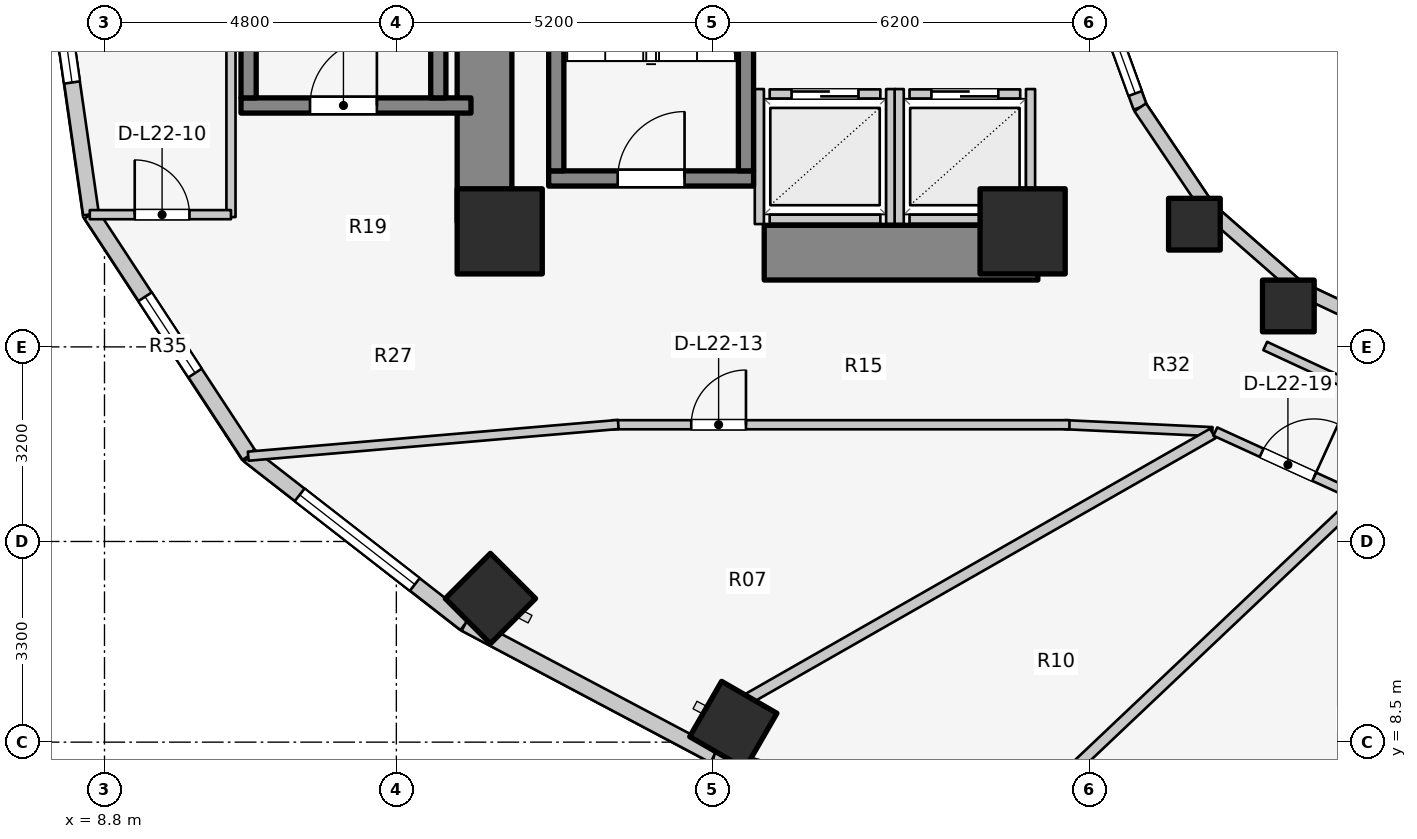
"""IFC4 building model, lengths in metres.
Left out: names, types, materials, properties, quantities, classifications, styles, units other than length and angle.
Written with IfcOpenShell. Run it as: python <this file> out.ifc"""

import sys

from ifc_helpers import new_model, si_unit, direction, frame, frame_2d, origin, origin_2d, place, context, subcontext, project, spatial, rectangle, extrude, element, fill, save


model = new_model("IFC4")
c1 = context("Model", 3, precision=1e-05, world=origin(), true_north=direction((0.0, 1.0)))
c2 = subcontext(c1, "Body", "Model", "MODEL_VIEW")
j1 = project(units=[si_unit("LENGTHUNIT", "METRE"), si_unit("PLANEANGLEUNIT", "RADIAN")], contexts=[c1])
p1 = place(None, origin())
s1 = spatial("IfcSite", under=j1, at=p1, CompositionType="ELEMENT")
p2 = place(p1, origin())
s2 = spatial("IfcBuilding", under=s1, at=p2, CompositionType="ELEMENT")
p3 = place(p2, frame((0.0, 0.0, 76.3)))
s3 = spatial("IfcBuildingStorey", under=s2, at=p3, CompositionType="ELEMENT", Elevation=76.3)
p4 = place(p3, frame((15.05, 17.05, 0.0), z_axis=(0.0, 0.0, 1.0), x_axis=(0.0, 1.0, 0.0)))
e1 = element("IfcWall", 1, at=p4, inside=s3, PredefinedType="SHEAR", context=c2, shape_type="SweptSolid", body=[
    extrude(rectangle(XDim=12.8, YDim=0.9, at=frame_2d((6.4, 0.0))), origin(), (0.0, 0.0, 1.0), 3.1),
])
p5 = place(p3, frame((19.65, 16.55, 0.0), z_axis=(0.0, 0.0, 1.0), x_axis=(1.0, 0.0, 0.0)))
e2 = element("IfcWall", 2, at=p5, inside=s3, PredefinedType="SHEAR", context=c2, shape_type="SweptSolid", body=[
    extrude(rectangle(XDim=4.5, YDim=0.9, at=frame_2d((2.25, 0.0))), origin(), (0.0, 0.0, 1.0), 3.1),
])
p6 = place(p3, frame((16.105, 17.77, 0.0), z_axis=(0.0, 0.0, 1.0), x_axis=(1.0, 0.0, 0.0)))
e3 = element("IfcWall", 3, at=p6, inside=s3, PredefinedType="SOLIDWALL", context=c2, shape_type="SweptSolid", body=[
    extrude(rectangle(XDim=3.37, YDim=0.25, at=frame_2d((1.685, 0.0))), origin(), (0.0, 0.0, 1.0), 3.1),
])
p7 = place(p6, frame((1.135, 0.0, 0.0)))
e4 = element("IfcOpeningElement", 4, at=p7, cuts=e3, PredefinedType="OPENING", context=c2, shape_type="SweptSolid", body=[
    extrude(rectangle(XDim=1.1, YDim=2.1, at=frame_2d((0.55, 1.05))), frame((0.0, 0.135, 0.0), z_axis=(0.0, -1.0, 0.0), x_axis=(1.0, 0.0, 0.0)), (0.0, 0.0, 1.0), 0.27),
])
for number, where, z_axis, x_axis in (
    (5, (16.23, 17.895, 0.0), (0.0, 0.0, 1.0), (0.0, 1.0, 0.0)),
    (6, (19.35, 17.895, 0.0), (0.0, 0.0, 1.0), (0.0, 1.0, 0.0)),
):
    element("IfcWall", number, at=place(p3, frame(where, z_axis=z_axis, x_axis=x_axis)), inside=s3, PredefinedType="SOLIDWALL", context=c2, shape_type="SweptSolid", body=[
        extrude(rectangle(XDim=7.81, YDim=0.25, at=frame_2d((3.905, 0.0))), origin(), (0.0, 0.0, 1.0), 3.1),
    ])
p8 = place(p3, frame((11.045, 18.97, 0.0), z_axis=(0.0, 0.0, 1.0), x_axis=(1.0, 0.0, 0.0)))
e7 = element("IfcWall", 7, at=p8, inside=s3, PredefinedType="SOLIDWALL", context=c2, shape_type="SweptSolid", body=[
    extrude(rectangle(XDim=3.782, YDim=0.25, at=frame_2d((1.891, 0.0))), origin(), (0.0, 0.0, 1.0), 3.1),
])
p9 = place(p8, frame((1.135, 0.0, 0.0)))
e8 = element("IfcOpeningElement", 8, at=p9, cuts=e7, PredefinedType="OPENING", context=c2, shape_type="SweptSolid", body=[
    extrude(rectangle(XDim=1.1, YDim=2.1, at=frame_2d((0.55, 1.05))), frame((0.0, 0.135, 0.0), z_axis=(0.0, -1.0, 0.0), x_axis=(1.0, 0.0, 0.0)), (0.0, 0.0, 1.0), 0.27),
])
for number, where, z_axis, x_axis in (
    (9, (11.17, 19.095, 0.0), (0.0, 0.0, 1.0), (0.0, 1.0, 0.0)),
    (10, (14.29, 19.095, 0.0), (0.0, 0.0, 1.0), (0.0, 1.0, 0.0)),
):
    element("IfcWall", number, at=place(p3, frame(where, z_axis=z_axis, x_axis=x_axis)), inside=s3, PredefinedType="SOLIDWALL", context=c2, shape_type="SweptSolid", body=[
        extrude(rectangle(XDim=7.81, YDim=0.25, at=frame_2d((3.905, 0.0))), origin(), (0.0, 0.0, 1.0), 3.1),
    ])
for number, where, z_axis, x_axis in (
    (11, (15.3, 16.9, 0.0), (0.0, 0.0, 1.0), (1.0, 0.0, 0.0)),
    (12, (23.9, 16.9, 0.0), (0.0, 0.0, 1.0), (1.0, 0.0, 0.0)),
):
    element("IfcColumn", number, at=place(p3, frame(where, z_axis=z_axis, x_axis=x_axis)), inside=s3, PredefinedType="COLUMN", context=c2, shape_type="SweptSolid", body=[
        extrude(rectangle(XDim=1.4, YDim=1.4, at=origin_2d()), origin(), (0.0, 0.0, 1.0), 3.1),
    ])
p10 = place(p3, frame((26.725, 17.018, 0.0), z_axis=(0.0, 0.0, 1.0), x_axis=(1.0, 0.0, 0.0)))
e13 = element("IfcColumn", 13, at=p10, inside=s3, PredefinedType="COLUMN", context=c2, shape_type="SweptSolid", body=[
    extrude(rectangle(XDim=0.85, YDim=0.85, at=origin_2d()), origin(), (0.0, 0.0, 1.0), 3.1),
])
p11 = place(p3, frame((15.147, 10.862, 0.0), z_axis=(0.0, 0.0, 1.0), x_axis=(-0.707106781187, -0.707106781187, 0.0)))
e14 = element("IfcColumn", 14, at=p11, inside=s3, PredefinedType="COLUMN", context=c2, shape_type="SweptSolid", body=[
    extrude(rectangle(XDim=1.05, YDim=1.05, at=origin_2d()), origin(), (0.0, 0.0, 1.0), 3.1),
])
p12 = place(p3, frame((28.27, 15.673, 0.0), z_axis=(0.0, 0.0, 1.0), x_axis=(1.0, 0.0, 0.0)))
e15 = element("IfcColumn", 15, at=p12, inside=s3, PredefinedType="COLUMN", context=c2, shape_type="SweptSolid", body=[
    extrude(rectangle(XDim=0.85, YDim=0.85, at=origin_2d()), origin(), (0.0, 0.0, 1.0), 3.1),
])
p13 = place(p3, frame((19.142, 8.782, 0.0), z_axis=(0.0, 0.0, 1.0), x_axis=(-0.5, -0.866025403784, 0.0)))
e16 = element("IfcColumn", 16, at=p13, inside=s3, PredefinedType="COLUMN", context=c2, shape_type="SweptSolid", body=[
    extrude(rectangle(XDim=1.05, YDim=1.05, at=origin_2d()), origin(), (0.0, 0.0, 1.0), 3.1),
])
p14 = place(p3, frame((25.123, 20.898, 0.0), z_axis=(0.0, 0.0, 1.0), x_axis=(0.341423187295, -0.93990968033, 0.0)))
e17 = element("IfcWall", 17, at=p14, inside=s3, PredefinedType="STANDARD", context=c2, shape_type="SweptSolid", body=[
    extrude(rectangle(XDim=2.084, YDim=0.23, at=frame_2d((1.042, 0.0))), origin(), (0.0, 0.0, 1.0), 2.84),
])
p15 = place(p14, frame((0.242, 0.0, 0.85)))
e18 = element("IfcOpeningElement", 18, at=p15, cuts=e17, PredefinedType="OPENING", context=c2, shape_type="SweptSolid", body=[
    extrude(rectangle(XDim=1.6, YDim=1.65, at=frame_2d((0.8, 0.825))), frame((0.0, 0.125, 0.0), z_axis=(0.0, -1.0, 0.0), x_axis=(1.0, 0.0, 0.0)), (0.0, 0.0, 1.0), 0.25),
])
p16 = place(p3, frame((25.834, 18.94, 0.0), z_axis=(0.0, 0.0, 1.0), x_axis=(0.558197800898, -0.829707909492, 0.0)))
e19 = element("IfcWall", 19, at=p16, inside=s3, PredefinedType="STANDARD", context=c2, shape_type="SweptSolid", body=[
    extrude(rectangle(XDim=2.027, YDim=0.23, at=frame_2d((1.013, 0.0))), origin(), (0.0, 0.0, 1.0), 2.16),
])
p17 = place(p3, frame((26.965, 17.258, 0.0), z_axis=(0.0, 0.0, 1.0), x_axis=(0.752576694707, -0.658504607869, 0.0)))
e20 = element("IfcWall", 20, at=p17, inside=s3, PredefinedType="STANDARD", context=c2, shape_type="SweptSolid", body=[
    extrude(rectangle(XDim=1.959, YDim=0.23, at=frame_2d((0.98, 0.0))), origin(), (0.0, 0.0, 1.0), 2.16),
])
p18 = place(p3, frame((28.44, 15.968, 0.0), z_axis=(0.0, 0.0, 1.0), x_axis=(0.904179699603, -0.427152280606, 0.0)))
e21 = element("IfcWall", 21, at=p18, inside=s3, PredefinedType="STANDARD", context=c2, shape_type="SweptSolid", body=[
    extrude(rectangle(XDim=1.899, YDim=0.23, at=frame_2d((0.95, 0.0))), origin(), (0.0, 0.0, 1.0), 2.16),
])
p19 = place(p3, frame((7.74, 23.0, 0.0), z_axis=(0.0, 0.0, 1.0), x_axis=(0.142572472068, -0.98978436551, 0.0)))
e22 = element("IfcWall", 22, at=p19, inside=s3, PredefinedType="STANDARD", context=c2, shape_type="SweptSolid", body=[
    extrude(rectangle(XDim=5.879, YDim=0.26, at=frame_2d((2.939, 0.0))), origin(), (0.0, 0.0, 1.0), 2.85),
])
p20 = place(p19, frame((2.189, 0.0, 0.75)))
e23 = element("IfcOpeningElement", 23, at=p20, cuts=e22, PredefinedType="OPENING", context=c2, shape_type="SweptSolid", body=[
    extrude(rectangle(XDim=1.5, YDim=1.6, at=frame_2d((0.75, 0.8))), frame((0.0, 0.14, 0.0), z_axis=(0.0, -1.0, 0.0), x_axis=(1.0, 0.0, 0.0)), (0.0, 0.0, 1.0), 0.28),
])
p21 = place(p3, frame((8.578, 17.181, 0.0), z_axis=(0.0, 0.0, 1.0), x_axis=(0.548283220945, -0.836292717672, 0.0)))
e24 = element("IfcWall", 24, at=p21, inside=s3, PredefinedType="STANDARD", context=c2, shape_type="SweptSolid", body=[
    extrude(rectangle(XDim=4.744, YDim=0.26, at=frame_2d((2.372, 0.0))), origin(), (0.0, 0.0, 1.0), 2.85),
])
p22 = place(p21, frame((1.622, 0.0, 0.75)))
e25 = element("IfcOpeningElement", 25, at=p22, cuts=e24, PredefinedType="OPENING", context=c2, shape_type="SweptSolid", body=[
    extrude(rectangle(XDim=1.5, YDim=1.6, at=frame_2d((0.75, 0.8))), frame((0.0, 0.14, 0.0), z_axis=(0.0, -1.0, 0.0), x_axis=(1.0, 0.0, 0.0)), (0.0, 0.0, 1.0), 0.28),
])
p23 = place(p3, frame((11.179, 13.214, 0.0), z_axis=(0.0, 0.0, 1.0), x_axis=(0.789127449954, -0.614229491094, 0.0)))
e26 = element("IfcWall", 26, at=p23, inside=s3, PredefinedType="STANDARD", context=c2, shape_type="SweptSolid", body=[
    extrude(rectangle(XDim=4.505, YDim=0.26, at=frame_2d((2.252, 0.0))), origin(), (0.0, 0.0, 1.0), 2.85),
])
p24 = place(p23, frame((1.052, 0.0, 0.75)))
e27 = element("IfcOpeningElement", 27, at=p24, cuts=e26, PredefinedType="OPENING", context=c2, shape_type="SweptSolid", body=[
    extrude(rectangle(XDim=2.4, YDim=1.7, at=frame_2d((1.2, 0.85))), frame((0.0, 0.14, 0.0), z_axis=(0.0, -1.0, 0.0), x_axis=(1.0, 0.0, 0.0)), (0.0, 0.0, 1.0), 0.28),
])
p25 = place(p3, frame((14.734, 10.447, 0.0), z_axis=(0.0, 0.0, 1.0), x_axis=(0.883668636807, -0.4681129568, 0.0)))
e28 = element("IfcWall", 28, at=p25, inside=s3, PredefinedType="STANDARD", context=c2, shape_type="SweptSolid", body=[
    extrude(rectangle(XDim=4.631, YDim=0.26, at=frame_2d((2.316, 0.0))), origin(), (0.0, 0.0, 1.0), 2.85),
])
p26 = place(p3, frame((18.827, 8.279, 0.0), z_axis=(0.0, 0.0, 1.0), x_axis=(0.962938491413, -0.269721081407, 0.0)))
e29 = element("IfcWall", 29, at=p26, inside=s3, PredefinedType="STANDARD", context=c2, shape_type="SweptSolid", body=[
    extrude(rectangle(XDim=5.563, YDim=0.26, at=frame_2d((2.782, 0.0))), origin(), (0.0, 0.0, 1.0), 2.85),
])
p27 = place(p26, frame((2.031, 0.0, 0.75)))
e30 = element("IfcOpeningElement", 30, at=p27, cuts=e29, PredefinedType="OPENING", context=c2, shape_type="SweptSolid", body=[
    extrude(rectangle(XDim=1.5, YDim=1.6, at=frame_2d((0.75, 0.8))), frame((0.0, 0.14, 0.0), z_axis=(0.0, -1.0, 0.0), x_axis=(1.0, 0.0, 0.0)), (0.0, 0.0, 1.0), 0.28),
])
p28 = place(p3, frame((19.74, 19.16, 0.0), z_axis=(0.0, 0.0, 1.0), x_axis=(1.0, 0.0, 0.0)))
e31 = element("IfcWall", 31, at=p28, inside=s3, PredefinedType="SOLIDWALL", context=c2, shape_type="SweptSolid", body=[
    extrude(rectangle(XDim=1.82, YDim=0.15, at=frame_2d((0.91, 0.0))), origin(), (0.0, 0.0, 1.0), 2.855),
])
p29 = place(p28, frame((0.36, 0.0, 0.0)))
e32 = element("IfcOpeningElement", 32, at=p29, cuts=e31, PredefinedType="OPENING", context=c2, shape_type="SweptSolid", body=[
    extrude(rectangle(XDim=1.1, YDim=2.1, at=frame_2d((0.55, 1.05))), frame((0.0, 0.085, 0.0), z_axis=(0.0, -1.0, 0.0), x_axis=(1.0, 0.0, 0.0)), (0.0, 0.0, 1.0), 0.17),
])
p30 = place(p3, frame((19.74, 17.1, 0.0), z_axis=(0.0, 0.0, 1.0), x_axis=(1.0, 0.0, 0.0)))
e33 = element("IfcWall", 33, at=p30, inside=s3, PredefinedType="SOLIDWALL", context=c2, shape_type="SweptSolid", body=[
    extrude(rectangle(XDim=1.82, YDim=0.15, at=frame_2d((0.91, 0.0))), origin(), (0.0, 0.0, 1.0), 2.855),
])
p31 = place(p3, frame((19.57, 17.02, 0.0), z_axis=(0.0, 0.0, 1.0), x_axis=(0.0, 1.0, 0.0)))
e34 = element("IfcWall", 34, at=p31, inside=s3, PredefinedType="SOLIDWALL", context=c2, shape_type="SweptSolid", body=[
    extrude(rectangle(XDim=2.22, YDim=0.15, at=frame_2d((1.11, 0.0))), origin(), (0.0, 0.0, 1.0), 2.12),
])
p32 = place(p3, frame((21.73, 17.02, 0.0), z_axis=(0.0, 0.0, 1.0), x_axis=(0.0, 1.0, 0.0)))
e35 = element("IfcWall", 35, at=p32, inside=s3, PredefinedType="SOLIDWALL", context=c2, shape_type="SweptSolid", body=[
    extrude(rectangle(XDim=2.22, YDim=0.15, at=frame_2d((1.11, 0.0))), origin(), (0.0, 0.0, 1.0), 2.855),
])
p33 = place(p3, frame((22.04, 19.16, 0.0), z_axis=(0.0, 0.0, 1.0), x_axis=(1.0, 0.0, 0.0)))
e36 = element("IfcWall", 36, at=p33, inside=s3, PredefinedType="SOLIDWALL", context=c2, shape_type="SweptSolid", body=[
    extrude(rectangle(XDim=1.82, YDim=0.15, at=frame_2d((0.91, 0.0))), origin(), (0.0, 0.0, 1.0), 2.12),
])
p34 = place(p33, frame((0.36, 0.0, 0.0)))
e37 = element("IfcOpeningElement", 37, at=p34, cuts=e36, PredefinedType="OPENING", context=c2, shape_type="SweptSolid", body=[
    extrude(rectangle(XDim=1.1, YDim=2.1, at=frame_2d((0.55, 1.05))), frame((0.0, 0.085, 0.0), z_axis=(0.0, -1.0, 0.0), x_axis=(1.0, 0.0, 0.0)), (0.0, 0.0, 1.0), 0.17),
])
p35 = place(p3, frame((22.04, 17.1, 0.0), z_axis=(0.0, 0.0, 1.0), x_axis=(1.0, 0.0, 0.0)))
e38 = element("IfcWall", 38, at=p35, inside=s3, PredefinedType="SOLIDWALL", context=c2, shape_type="SweptSolid", body=[
    extrude(rectangle(XDim=1.82, YDim=0.15, at=frame_2d((0.91, 0.0))), origin(), (0.0, 0.0, 1.0), 2.12),
])
p36 = place(p3, frame((21.87, 17.02, 0.0), z_axis=(0.0, 0.0, 1.0), x_axis=(0.0, 1.0, 0.0)))
e39 = element("IfcWall", 39, at=p36, inside=s3, PredefinedType="SOLIDWALL", context=c2, shape_type="SweptSolid", body=[
    extrude(rectangle(XDim=2.22, YDim=0.15, at=frame_2d((1.11, 0.0))), origin(), (0.0, 0.0, 1.0), 2.855),
])
p37 = place(p3, frame((24.03, 17.02, 0.0), z_axis=(0.0, 0.0, 1.0), x_axis=(0.0, 1.0, 0.0)))
e40 = element("IfcWall", 40, at=p37, inside=s3, PredefinedType="SOLIDWALL", context=c2, shape_type="SweptSolid", body=[
    extrude(rectangle(XDim=2.22, YDim=0.15, at=frame_2d((1.11, 0.0))), origin(), (0.0, 0.0, 1.0), 2.12),
])
p38 = place(p3, frame((27.89, 15.015, 0.0), z_axis=(0.0, 0.0, 1.0), x_axis=(0.906943449489, -0.421252393975, 0.0)))
e41 = element("IfcWall", 41, at=p38, inside=s3, PredefinedType="PARTITIONING", context=c2, shape_type="SweptSolid", body=[
    extrude(rectangle(XDim=2.186, YDim=0.15, at=frame_2d((1.093, 0.0))), origin(), (0.0, 0.0, 1.0), 2.272),
])
p39 = place(p3, frame((10.88, 17.135, 0.0), z_axis=(0.0, 0.0, 1.0), x_axis=(0.0, 1.0, 0.0)))
e42 = element("IfcWall", 42, at=p39, inside=s3, PredefinedType="PARTITIONING", context=c2, shape_type="SweptSolid", body=[
    extrude(rectangle(XDim=11.73, YDim=0.15, at=frame_2d((5.865, 0.0))), origin(), (0.0, 0.0, 1.0), 2.12),
])
p40 = place(p3, frame((8.558, 17.175, 0.0), z_axis=(0.0, 0.0, 1.0), x_axis=(1.0, 0.0, 0.0)))
e43 = element("IfcWall", 43, at=p40, inside=s3, PredefinedType="PARTITIONING", context=c2, shape_type="SweptSolid", body=[
    extrude(rectangle(XDim=2.322, YDim=0.15, at=frame_2d((1.161, 0.0))), origin(), (0.0, 0.0, 1.0), 2.855),
])
p41 = place(p40, frame((0.739, 0.0, 0.0)))
e44 = element("IfcOpeningElement", 44, at=p41, cuts=e43, PredefinedType="OPENING", context=c2, shape_type="SweptSolid", body=[
    extrude(rectangle(XDim=0.9, YDim=2.1, at=frame_2d((0.45, 1.05))), frame((0.0, 0.085, 0.0), z_axis=(0.0, -1.0, 0.0), x_axis=(1.0, 0.0, 0.0)), (0.0, 0.0, 1.0), 0.17),
])
p42 = place(p3, frame((27.02, 13.606, 0.0), z_axis=(0.0, 0.0, 1.0), x_axis=(-0.998877427952, 0.047369651964, 0.0)))
e45 = element("IfcWall", 45, at=p42, inside=s3, PredefinedType="PARTITIONING", context=c2, shape_type="SweptSolid", body=[
    extrude(rectangle(XDim=2.433, YDim=0.15, at=frame_2d((1.216, 0.0))), origin(), (0.0, 0.0, 1.0), 2.272),
])
p43 = place(p3, frame((17.15, 13.72, 0.0), z_axis=(0.0, 0.0, 1.0), x_axis=(1.0, 0.0, 0.0)))
e46 = element("IfcWall", 46, at=p43, inside=s3, PredefinedType="PARTITIONING", context=c2, shape_type="SweptSolid", body=[
    extrude(rectangle(XDim=7.52, YDim=0.15, at=frame_2d((3.76, 0.0))), origin(), (0.0, 0.0, 1.0), 2.272),
])
p44 = place(p43, frame((1.3, 0.0, 0.0)))
e47 = element("IfcOpeningElement", 47, at=p44, cuts=e46, PredefinedType="OPENING", context=c2, shape_type="SweptSolid", body=[
    extrude(rectangle(XDim=0.9, YDim=2.1, at=frame_2d((0.45, 1.05))), frame((0.0, 0.085, 0.0), z_axis=(0.0, -1.0, 0.0), x_axis=(1.0, 0.0, 0.0)), (0.0, 0.0, 1.0), 0.17),
])
p45 = place(p3, frame((17.25, 13.724, 0.0), z_axis=(0.0, 0.0, 1.0), x_axis=(-0.996341886029, -0.085456691633, 0.0)))
e48 = element("IfcWall", 48, at=p45, inside=s3, PredefinedType="PARTITIONING", context=c2, shape_type="SweptSolid", body=[
    extrude(rectangle(XDim=6.108, YDim=0.15, at=frame_2d((3.054, 0.0))), origin(), (0.0, 0.0, 1.0), 2.142),
])
p46 = place(p3, frame((27.027, 13.576, 0.0), z_axis=(0.0, 0.0, 1.0), x_axis=(-0.868484076301, -0.495717065685, 0.0)))
e49 = element("IfcWall", 49, at=p46, inside=s3, PredefinedType="PARTITIONING", context=c2, shape_type="SweptSolid", body=[
    extrude(rectangle(XDim=8.789, YDim=0.18, at=frame_2d((4.394, 0.0))), origin(), (0.0, 0.0, 1.0), 2.272),
])
p47 = place(p3, frame((29.411, 12.482, 0.0), z_axis=(0.0, 0.0, 1.0), x_axis=(-0.726306601605, -0.687370875485, 0.0)))
e50 = element("IfcWall", 50, at=p47, inside=s3, PredefinedType="PARTITIONING", context=c2, shape_type="SweptSolid", body=[
    extrude(rectangle(XDim=6.76, YDim=0.18, at=frame_2d((3.38, 0.0))), origin(), (0.0, 0.0, 1.0), 2.272),
])
p48 = place(p3, frame((27.069, 13.607, 0.0), z_axis=(0.0, 0.0, 1.0), x_axis=(0.909747571199, -0.415161843982, 0.0)))
e51 = element("IfcWall", 51, at=p48, inside=s3, PredefinedType="PARTITIONING", context=c2, shape_type="SweptSolid", body=[
    extrude(rectangle(XDim=2.625, YDim=0.15, at=frame_2d((1.312, 0.0))), origin(), (0.0, 0.0, 1.0), 2.272),
])
p49 = place(p48, frame((0.838, 0.0, 0.0)))
e52 = element("IfcOpeningElement", 52, at=p49, cuts=e51, PredefinedType="OPENING", context=c2, shape_type="SweptSolid", body=[
    extrude(rectangle(XDim=0.95, YDim=2.1, at=frame_2d((0.475, 1.05))), frame((0.0, 0.085, 0.0), z_axis=(0.0, -1.0, 0.0), x_axis=(1.0, 0.0, 0.0)), (0.0, 0.0, 1.0), 0.17),
])
p50 = place(p15, origin())
e53 = element("IfcWindow", 53, at=p50, inside=s3, PartitioningType="SINGLE_PANEL", PredefinedType="WINDOW", context=c2, shape_type="SweptSolid", body=[
    extrude(rectangle(XDim=1.6, YDim=1.65, at=frame_2d((0.8, 0.825))), frame((0.0, 0.03, 0.0), z_axis=(0.0, -1.0, 0.0), x_axis=(1.0, 0.0, 0.0)), (0.0, 0.0, 1.0), 0.06),
])
fill(e18, e53)
p51 = place(p20, origin())
e54 = element("IfcWindow", 54, at=p51, inside=s3, PartitioningType="SINGLE_PANEL", PredefinedType="WINDOW", context=c2, shape_type="SweptSolid", body=[
    extrude(rectangle(XDim=1.5, YDim=1.6, at=frame_2d((0.75, 0.8))), frame((0.0, 0.03, 0.0), z_axis=(0.0, -1.0, 0.0), x_axis=(1.0, 0.0, 0.0)), (0.0, 0.0, 1.0), 0.06),
])
fill(e23, e54)
p52 = place(p22, origin())
e55 = element("IfcWindow", 55, at=p52, inside=s3, PartitioningType="SINGLE_PANEL", PredefinedType="WINDOW", context=c2, shape_type="SweptSolid", body=[
    extrude(rectangle(XDim=1.5, YDim=1.6, at=frame_2d((0.75, 0.8))), frame((0.0, 0.03, 0.0), z_axis=(0.0, -1.0, 0.0), x_axis=(1.0, 0.0, 0.0)), (0.0, 0.0, 1.0), 0.06),
])
fill(e25, e55)
p53 = place(p24, origin())
e56 = element("IfcWindow", 56, at=p53, inside=s3, PartitioningType="SINGLE_PANEL", PredefinedType="WINDOW", context=c2, shape_type="SweptSolid", body=[
    extrude(rectangle(XDim=2.4, YDim=1.7, at=frame_2d((1.2, 0.85))), frame((0.0, 0.03, 0.0), z_axis=(0.0, -1.0, 0.0), x_axis=(1.0, 0.0, 0.0)), (0.0, 0.0, 1.0), 0.06),
])
fill(e27, e56)
p54 = place(p7, origin())
e57 = element("IfcDoor", 57, at=p54, inside=s3, OperationType="SINGLE_SWING_RIGHT", PredefinedType="DOOR", context=c2, shape_type="SweptSolid", body=[
    extrude(rectangle(XDim=1.1, YDim=2.1, at=frame_2d((0.55, 1.05))), frame((0.0, 0.025, 0.0), z_axis=(0.0, -1.0, 0.0), x_axis=(1.0, 0.0, 0.0)), (0.0, 0.0, 1.0), 0.05),
])
fill(e4, e57)
p55 = place(p9, origin())
e58 = element("IfcDoor", 58, at=p55, inside=s3, OperationType="SINGLE_SWING_RIGHT", PredefinedType="DOOR", context=c2, shape_type="SweptSolid", body=[
    extrude(rectangle(XDim=1.1, YDim=2.1, at=frame_2d((0.55, 1.05))), frame((0.0, 0.025, 0.0), z_axis=(0.0, -1.0, 0.0), x_axis=(1.0, 0.0, 0.0)), (0.0, 0.0, 1.0), 0.05),
])
fill(e8, e58)
p56 = place(p29, origin())
e59 = element("IfcDoor", 59, at=p56, inside=s3, OperationType="DOUBLE_DOOR_SLIDING", PredefinedType="DOOR", context=c2, shape_type="SweptSolid", body=[
    extrude(rectangle(XDim=1.1, YDim=2.1, at=frame_2d((0.55, 1.05))), frame((0.0, 0.025, 0.0), z_axis=(0.0, -1.0, 0.0), x_axis=(1.0, 0.0, 0.0)), (0.0, 0.0, 1.0), 0.05),
])
fill(e32, e59)
p57 = place(p34, origin())
e60 = element("IfcDoor", 60, at=p57, inside=s3, OperationType="DOUBLE_DOOR_SLIDING", PredefinedType="DOOR", context=c2, shape_type="SweptSolid", body=[
    extrude(rectangle(XDim=1.1, YDim=2.1, at=frame_2d((0.55, 1.05))), frame((0.0, 0.025, 0.0), z_axis=(0.0, -1.0, 0.0), x_axis=(1.0, 0.0, 0.0)), (0.0, 0.0, 1.0), 0.05),
])
fill(e37, e60)
p58 = place(p41, origin())
e61 = element("IfcDoor", 61, at=p58, inside=s3, OperationType="SINGLE_SWING_LEFT", PredefinedType="DOOR", context=c2, shape_type="SweptSolid", body=[
    extrude(rectangle(XDim=0.9, YDim=2.1, at=frame_2d((0.45, 1.05))), frame((0.0, 0.025, 0.0), z_axis=(0.0, -1.0, 0.0), x_axis=(1.0, 0.0, 0.0)), (0.0, 0.0, 1.0), 0.05),
])
fill(e44, e61)
p59 = place(p44, origin())
e62 = element("IfcDoor", 62, at=p59, inside=s3, OperationType="SINGLE_SWING_RIGHT", PredefinedType="DOOR", context=c2, shape_type="SweptSolid", body=[
    extrude(rectangle(XDim=0.9, YDim=2.1, at=frame_2d((0.45, 1.05))), frame((0.0, 0.025, 0.0), z_axis=(0.0, -1.0, 0.0), x_axis=(1.0, 0.0, 0.0)), (0.0, 0.0, 1.0), 0.05),
])
fill(e47, e62)
p60 = place(p49, origin())
e63 = element("IfcDoor", 63, at=p60, inside=s3, OperationType="SINGLE_SWING_RIGHT", PredefinedType="DOOR", context=c2, shape_type="SweptSolid", body=[
    extrude(rectangle(XDim=0.95, YDim=2.1, at=frame_2d((0.475, 1.05))), frame((0.0, 0.025, 0.0), z_axis=(0.0, -1.0, 0.0), x_axis=(1.0, 0.0, 0.0)), (0.0, 0.0, 1.0), 0.05),
])
fill(e52, e63)
save(model, sys.argv[1])
